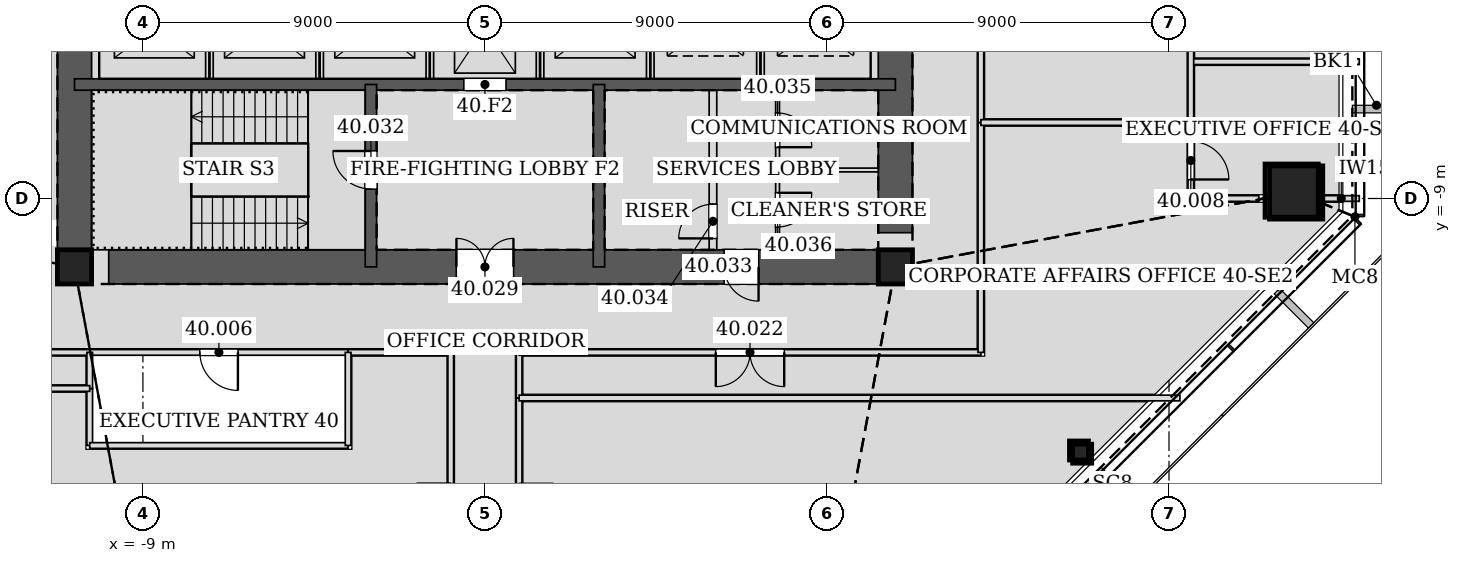
"""IFC4 building model, lengths in metres.
Left out: names, types, materials, properties, quantities, classifications, styles, units other than length and angle.
Written with IfcOpenShell. Run it as: python <this file> out.ifc"""

import sys

from ifc_helpers import new_model, si_unit, direction, frame, frame_2d, origin, origin_2d, place, context, subcontext, project, spatial, rectangle, hollow_rectangle, extrude, element, fill, save


model = new_model("IFC4")
c1 = context("Model", 3, precision=1e-05, world=origin(), true_north=direction((0.0, 1.0)))
c2 = subcontext(c1, "Body", "Model", "MODEL_VIEW")
j1 = project(units=[si_unit("LENGTHUNIT", "METRE"), si_unit("PLANEANGLEUNIT", "RADIAN")], contexts=[c1])
p1 = place(None, origin())
s1 = spatial("IfcSite", under=j1, at=p1, CompositionType="ELEMENT")
p2 = place(p1, origin())
s2 = spatial("IfcBuilding", under=s1, at=p2, CompositionType="ELEMENT")
p3 = place(p2, frame((0.0, 0.0, 176.4)))
s3 = spatial("IfcBuildingStorey", under=s2, at=p3, CompositionType="ELEMENT", Elevation=176.4)
p4 = place(p3, frame((21.346, -8.842, 0.0), z_axis=(-0.028294087032, 0.011735945751, 0.999530746009), x_axis=(-0.383133442967, -0.923693003589, 0.0)))
e1 = element("IfcColumn", 1, at=p4, inside=s3, PredefinedType="COLUMN", context=c2, shape_type="SweptSolid", body=[
    extrude(hollow_rectangle(XDim=1.4, YDim=1.4, WallThickness=0.065, at=origin_2d()), origin(), (0.0, 0.0, 1.0), 4.202),
])
p5 = place(p3, frame((15.715, -15.715, 0.0), z_axis=(-0.019987360289, 0.019987360289, 0.999600425599), x_axis=(-0.707106781187, -0.707106781187, 0.0)))
e2 = element("IfcColumn", 2, at=p5, inside=s3, PredefinedType="COLUMN", context=c2, shape_type="SweptSolid", body=[
    extrude(hollow_rectangle(XDim=0.5, YDim=0.5, WallThickness=0.025, at=origin_2d()), origin(), (0.0, 0.0, 1.0), 4.202),
])
for number, where, z_axis, x_axis in (
    (3, (-10.8, -10.8, 0.0), (0.0, 0.0, 1.0), (1.0, 0.0, 0.0)),
    (4, (10.8, -10.8, 0.0), (0.0, 0.0, 1.0), (1.0, 0.0, 0.0)),
):
    element("IfcColumn", number, at=place(p3, frame(where, z_axis=z_axis, x_axis=x_axis)), inside=s3, PredefinedType="COLUMN", context=c2, shape_type="SweptSolid", body=[
        extrude(hollow_rectangle(XDim=0.9, YDim=0.9, WallThickness=0.06, at=origin_2d()), origin(), (0.0, 0.0, 1.0), 4.2),
    ])
p6 = place(p3, frame((-10.8, -10.8, 0.0), z_axis=(0.0, 0.0, 1.0), x_axis=(1.0, 0.0, 0.0)))
e5 = element("IfcWall", 5, at=p6, inside=s3, PredefinedType="SOLIDWALL", context=c2, shape_type="SweptSolid", body=[
    extrude(rectangle(XDim=21.6, YDim=0.9, at=frame_2d((10.8, 0.0))), origin(), (0.0, 0.0, 1.0), 4.2),
])
p7 = place(p6, frame((10.05, 0.0, 0.0)))
e6 = element("IfcOpeningElement", 6, at=p7, cuts=e5, PredefinedType="OPENING", context=c2, shape_type="SweptSolid", body=[
    extrude(rectangle(XDim=1.5, YDim=2.1, at=frame_2d((0.75, 1.05))), frame((0.0, 0.46, 0.0), z_axis=(0.0, -1.0, 0.0), x_axis=(1.0, 0.0, 0.0)), (0.0, 0.0, 1.0), 0.92),
])
p8 = place(p6, frame((17.1, 0.0, 0.0)))
e7 = element("IfcOpeningElement", 7, at=p8, cuts=e5, PredefinedType="OPENING", context=c2, shape_type="SweptSolid", body=[
    extrude(rectangle(XDim=0.9, YDim=2.1, at=frame_2d((0.45, 1.05))), frame((0.0, 0.46, 0.0), z_axis=(0.0, -1.0, 0.0), x_axis=(1.0, 0.0, 0.0)), (0.0, 0.0, 1.0), 0.92),
])
p9 = place(p3, frame((10.8, -10.8, 0.0), z_axis=(0.0, 0.0, 1.0), x_axis=(0.0, 1.0, 0.0)))
e8 = element("IfcWall", 8, at=p9, inside=s3, PredefinedType="SOLIDWALL", context=c2, shape_type="SweptSolid", body=[
    extrude(rectangle(XDim=21.6, YDim=0.9, at=frame_2d((10.8, 0.0))), origin(), (0.0, 0.0, 1.0), 4.2),
])
p10 = place(p9, frame((11.7, 0.0, 0.0)))
e9 = element("IfcOpeningElement", 9, at=p10, cuts=e8, PredefinedType="OPENING", context=c2, shape_type="SweptSolid", body=[
    extrude(rectangle(XDim=1.2, YDim=2.1, at=frame_2d((0.6, 1.05))), frame((0.0, 0.46, 0.0), z_axis=(0.0, -1.0, 0.0), x_axis=(1.0, 0.0, 0.0)), (0.0, 0.0, 1.0), 0.92),
])
p11 = place(p9, frame((8.7, 0.0, 0.0)))
e10 = element("IfcOpeningElement", 10, at=p11, cuts=e8, PredefinedType="OPENING", context=c2, shape_type="SweptSolid", body=[
    extrude(rectangle(XDim=1.2, YDim=2.1, at=frame_2d((0.6, 1.05))), frame((0.0, 0.46, 0.0), z_axis=(0.0, -1.0, 0.0), x_axis=(1.0, 0.0, 0.0)), (0.0, 0.0, 1.0), 0.92),
])
p12 = place(p3, frame((-10.8, 10.8, 0.0), z_axis=(0.0, 0.0, 1.0), x_axis=(0.0, -1.0, 0.0)))
e11 = element("IfcWall", 11, at=p12, inside=s3, PredefinedType="SOLIDWALL", context=c2, shape_type="SweptSolid", body=[
    extrude(rectangle(XDim=21.6, YDim=0.9, at=frame_2d((10.8, 0.0))), origin(), (0.0, 0.0, 1.0), 4.2),
])
p13 = place(p12, frame((8.7, 0.0, 0.0)))
e12 = element("IfcOpeningElement", 12, at=p13, cuts=e11, PredefinedType="OPENING", context=c2, shape_type="SweptSolid", body=[
    extrude(rectangle(XDim=1.2, YDim=2.1, at=frame_2d((0.6, 1.05))), frame((0.0, 0.46, 0.0), z_axis=(0.0, -1.0, 0.0), x_axis=(1.0, 0.0, 0.0)), (0.0, 0.0, 1.0), 0.92),
])
p14 = place(p12, frame((11.7, 0.0, 0.0)))
e13 = element("IfcOpeningElement", 13, at=p14, cuts=e11, PredefinedType="OPENING", context=c2, shape_type="SweptSolid", body=[
    extrude(rectangle(XDim=1.2, YDim=2.1, at=frame_2d((0.6, 1.05))), frame((0.0, 0.46, 0.0), z_axis=(0.0, -1.0, 0.0), x_axis=(1.0, 0.0, 0.0)), (0.0, 0.0, 1.0), 0.92),
])
p15 = place(p3, frame((-10.8, -6.0, 0.0), z_axis=(0.0, 0.0, 1.0), x_axis=(1.0, 0.0, 0.0)))
e14 = element("IfcWall", 14, at=p15, inside=s3, PredefinedType="SOLIDWALL", context=c2, shape_type="SweptSolid", body=[
    extrude(rectangle(XDim=21.6, YDim=0.3, at=frame_2d((10.8, 0.0))), origin(), (0.0, 0.0, 1.0), 4.2),
])
p16 = place(p15, frame((10.25, 0.0, 0.0)))
e15 = element("IfcOpeningElement", 15, at=p16, cuts=e14, PredefinedType="OPENING", context=c2, shape_type="SweptSolid", body=[
    extrude(rectangle(XDim=1.1, YDim=2.1, at=frame_2d((0.55, 1.05))), frame((0.0, 0.16, 0.0), z_axis=(0.0, -1.0, 0.0), x_axis=(1.0, 0.0, 0.0)), (0.0, 0.0, 1.0), 0.32),
])
p17 = place(p3, frame((-3.0, -6.0, 0.0), z_axis=(0.0, 0.0, 1.0), x_axis=(0.0, -1.0, 0.0)))
e16 = element("IfcWall", 16, at=p17, inside=s3, PredefinedType="SOLIDWALL", context=c2, shape_type="SweptSolid", body=[
    extrude(rectangle(XDim=4.8, YDim=0.3, at=frame_2d((2.4, 0.0))), origin(), (0.0, 0.0, 1.0), 4.2),
])
p18 = place(p17, frame((1.75, 0.0, 0.0)))
e17 = element("IfcOpeningElement", 17, at=p18, cuts=e16, PredefinedType="OPENING", context=c2, shape_type="SweptSolid", body=[
    extrude(rectangle(XDim=1.0, YDim=2.1, at=frame_2d((0.5, 1.05))), frame((0.0, 0.16, 0.0), z_axis=(0.0, -1.0, 0.0), x_axis=(1.0, 0.0, 0.0)), (0.0, 0.0, 1.0), 0.32),
])
p19 = place(p3, frame((3.0, -6.0, 0.0), z_axis=(0.0, 0.0, 1.0), x_axis=(0.0, -1.0, 0.0)))
e18 = element("IfcWall", 18, at=p19, inside=s3, PredefinedType="SOLIDWALL", context=c2, shape_type="SweptSolid", body=[
    extrude(rectangle(XDim=4.8, YDim=0.3, at=frame_2d((2.4, 0.0))), origin(), (0.0, 0.0, 1.0), 4.2),
])
p20 = place(p3, frame((-10.401, -13.05, 0.0), z_axis=(0.0, 0.0, 1.0), x_axis=(1.0, 0.0, 0.0)))
e19 = element("IfcWall", 19, at=p20, inside=s3, PredefinedType="PARTITIONING", context=c2, shape_type="SweptSolid", body=[
    extrude(rectangle(XDim=6.802, YDim=0.15, at=frame_2d((3.401, 0.0))), origin(), (0.0, 0.0, 1.0), 3.098),
])
p21 = place(p20, frame((2.901, 0.0, 0.0)))
e20 = element("IfcOpeningElement", 20, at=p21, cuts=e19, PredefinedType="OPENING", context=c2, shape_type="SweptSolid", body=[
    extrude(rectangle(XDim=1.0, YDim=2.1, at=frame_2d((0.5, 1.05))), frame((0.0, 0.085, 0.0), z_axis=(0.0, -1.0, 0.0), x_axis=(1.0, 0.0, 0.0)), (0.0, 0.0, 1.0), 0.17),
])
p22 = place(p3, frame((-3.601, -13.05, 0.0), z_axis=(0.0, 0.0, 1.0), x_axis=(1.0, 0.0, 0.0)))
e21 = element("IfcWall", 21, at=p22, inside=s3, PredefinedType="PARTITIONING", context=c2, shape_type="SweptSolid", body=[
    extrude(rectangle(XDim=2.701, YDim=0.15, at=frame_2d((1.351, 0.0))), origin(), (0.0, 0.0, 1.0), 4.035),
])
p23 = place(p3, frame((-0.9, -13.05, 0.0), z_axis=(0.0, 0.0, 1.0), x_axis=(0.0, -1.0, 0.0)))
e22 = element("IfcWall", 22, at=p23, inside=s3, PredefinedType="PARTITIONING", context=c2, shape_type="SweptSolid", body=[
    extrude(rectangle(XDim=9.958, YDim=0.15, at=frame_2d((4.979, 0.0))), origin(), (0.0, 0.0, 1.0), 3.426),
])
p24 = place(p23, frame((3.452, 0.0, 0.0)))
e23 = element("IfcOpeningElement", 23, at=p24, cuts=e22, PredefinedType="OPENING", context=c2, shape_type="SweptSolid", body=[
    extrude(rectangle(XDim=1.8, YDim=2.4, at=frame_2d((0.9, 1.2))), frame((0.0, 0.085, 0.0), z_axis=(0.0, -1.0, 0.0), x_axis=(1.0, 0.0, 0.0)), (0.0, 0.0, 1.0), 0.17),
])
p25 = place(p3, frame((-13.05, -13.05, 0.0), z_axis=(0.0, 0.0, 1.0), x_axis=(1.0, 0.0, 0.0)))
e24 = element("IfcWall", 24, at=p25, inside=s3, PredefinedType="PARTITIONING", context=c2, shape_type="SweptSolid", body=[
    extrude(rectangle(XDim=2.651, YDim=0.15, at=frame_2d((1.326, 0.0))), origin(), (0.0, 0.0, 1.0), 3.098),
])
p26 = place(p3, frame((0.9, -23.009, 0.0), z_axis=(0.0, 0.0, 1.0), x_axis=(0.0, 1.0, 0.0)))
e25 = element("IfcWall", 25, at=p26, inside=s3, PredefinedType="PARTITIONING", context=c2, shape_type="SweptSolid", body=[
    extrude(rectangle(XDim=8.76, YDim=0.15, at=frame_2d((4.38, 0.0))), origin(), (0.0, 0.0, 1.0), 3.492),
])
p27 = place(p26, frame((4.702, 0.0, 0.0)))
e26 = element("IfcOpeningElement", 26, at=p27, cuts=e25, PredefinedType="OPENING", context=c2, shape_type="SweptSolid", body=[
    extrude(rectangle(XDim=1.8, YDim=2.4, at=frame_2d((0.9, 1.2))), frame((0.0, 0.085, 0.0), z_axis=(0.0, -1.0, 0.0), x_axis=(1.0, 0.0, 0.0)), (0.0, 0.0, 1.0), 0.17),
])
p28 = place(p3, frame((0.9, -14.251, 0.0), z_axis=(0.0, 0.0, 1.0), x_axis=(0.0, 1.0, 0.0)))
e27 = element("IfcWall", 27, at=p28, inside=s3, PredefinedType="PARTITIONING", context=c2, shape_type="SweptSolid", body=[
    extrude(rectangle(XDim=1.201, YDim=0.15, at=frame_2d((0.601, 0.0))), origin(), (0.0, 0.0, 1.0), 3.426),
])
p29 = place(p3, frame((0.9, -13.05, 0.0), z_axis=(0.0, 0.0, 1.0), x_axis=(1.0, 0.0, 0.0)))
e28 = element("IfcWall", 28, at=p29, inside=s3, PredefinedType="PARTITIONING", context=c2, shape_type="SweptSolid", body=[
    extrude(rectangle(XDim=12.15, YDim=0.15, at=frame_2d((6.075, 0.0))), origin(), (0.0, 0.0, 1.0), 3.098),
])
p30 = place(p29, frame((5.175, 0.0, 0.0)))
e29 = element("IfcOpeningElement", 29, at=p30, cuts=e28, PredefinedType="OPENING", context=c2, shape_type="SweptSolid", body=[
    extrude(rectangle(XDim=1.8, YDim=2.4, at=frame_2d((0.9, 1.2))), frame((0.0, 0.085, 0.0), z_axis=(0.0, -1.0, 0.0), x_axis=(1.0, 0.0, 0.0)), (0.0, 0.0, 1.0), 0.17),
])
p31 = place(p3, frame((13.05, -13.05, 0.0), z_axis=(0.0, 0.0, 1.0), x_axis=(0.0, 1.0, 0.0)))
e30 = element("IfcWall", 30, at=p31, inside=s3, PredefinedType="PARTITIONING", context=c2, shape_type="SweptSolid", body=[
    extrude(rectangle(XDim=6.051, YDim=0.15, at=frame_2d((3.025, 0.0))), origin(), (0.0, 0.0, 1.0), 3.098),
])
p32 = place(p3, frame((13.05, -7.001, 0.0), z_axis=(0.0, 0.0, 1.0), x_axis=(0.0, 1.0, 0.0)))
e31 = element("IfcWall", 31, at=p32, inside=s3, PredefinedType="PARTITIONING", context=c2, shape_type="SweptSolid", body=[
    extrude(rectangle(XDim=2.502, YDim=0.15, at=frame_2d((1.251, 0.0))), origin(), (0.0, 0.0, 1.0), 4.035),
])
p33 = place(p3, frame((-10.4, -13.999, 0.0), z_axis=(0.0, 0.0, 1.0), x_axis=(0.0, -1.0, 0.0)))
e32 = element("IfcWall", 32, at=p33, inside=s3, PredefinedType="PARTITIONING", context=c2, shape_type="SweptSolid", body=[
    extrude(rectangle(XDim=1.501, YDim=0.15, at=frame_2d((0.75, 0.0))), origin(), (0.0, 0.0, 1.0), 3.098),
])
p34 = place(p3, frame((-10.4, -15.5, 0.0), z_axis=(0.0, 0.0, 1.0), x_axis=(1.0, 0.0, 0.0)))
e33 = element("IfcWall", 33, at=p34, inside=s3, PredefinedType="PARTITIONING", context=c2, shape_type="SweptSolid", body=[
    extrude(rectangle(XDim=6.8, YDim=0.15, at=frame_2d((3.4, 0.0))), origin(), (0.0, 0.0, 1.0), 3.098),
])
p35 = place(p3, frame((-3.6, -15.5, 0.0), z_axis=(0.0, 0.0, 1.0), x_axis=(0.0, 1.0, 0.0)))
e34 = element("IfcWall", 34, at=p35, inside=s3, PredefinedType="PARTITIONING", context=c2, shape_type="SweptSolid", body=[
    extrude(rectangle(XDim=2.45, YDim=0.15, at=frame_2d((1.225, 0.0))), origin(), (0.0, 0.0, 1.0), 3.426),
])
p36 = place(p3, frame((-10.4, -13.05, 0.0), z_axis=(0.0, 0.0, 1.0), x_axis=(0.0, -1.0, 0.0)))
e35 = element("IfcWall", 35, at=p36, inside=s3, PredefinedType="PARTITIONING", context=c2, shape_type="SweptSolid", body=[
    extrude(rectangle(XDim=0.951, YDim=0.15, at=frame_2d((0.476, 0.0))), origin(), (0.0, 0.0, 1.0), 3.098),
])
p37 = place(p3, frame((23.007, -5.4, 0.0), z_axis=(0.0, 0.0, 1.0), x_axis=(-1.0, 0.0, 0.0)))
e36 = element("IfcWall", 36, at=p37, inside=s3, PredefinedType="PARTITIONING", context=c2, shape_type="SweptSolid", body=[
    extrude(rectangle(XDim=4.432, YDim=0.15, at=frame_2d((2.216, 0.0))), origin(), (0.0, 0.0, 1.0), 3.492),
])
p38 = place(p3, frame((18.575, -6.999, 0.0), z_axis=(0.0, 0.0, 1.0), x_axis=(0.0, -1.0, 0.0)))
e37 = element("IfcWall", 37, at=p38, inside=s3, PredefinedType="PARTITIONING", context=c2, shape_type="SweptSolid", body=[
    extrude(rectangle(XDim=2.001, YDim=0.15, at=frame_2d((1.0, 0.0))), origin(), (0.0, 0.0, 1.0), 4.035),
])
p39 = place(p38, frame((0.5, 0.0, 0.0)))
e38 = element("IfcOpeningElement", 38, at=p39, cuts=e37, PredefinedType="OPENING", context=c2, shape_type="SweptSolid", body=[
    extrude(rectangle(XDim=1.0, YDim=2.1, at=frame_2d((0.5, 1.05))), frame((0.0, 0.085, 0.0), z_axis=(0.0, -1.0, 0.0), x_axis=(1.0, 0.0, 0.0)), (0.0, 0.0, 1.0), 0.17),
])
p40 = place(p3, frame((18.575, -9.0, 0.0), z_axis=(0.0, 0.0, 1.0), x_axis=(1.0, 0.0, 0.0)))
e39 = element("IfcWall", 39, at=p40, inside=s3, PredefinedType="PARTITIONING", context=c2, shape_type="SweptSolid", body=[
    extrude(rectangle(XDim=1.789, YDim=0.15, at=frame_2d((0.894, 0.0))), origin(), (0.0, 0.0, 1.0), 3.098),
])
p41 = place(p3, frame((22.06, -9.0, 0.0), z_axis=(0.0, 0.0, 1.0), x_axis=(1.0, 0.0, 0.0)))
e40 = element("IfcWall", 40, at=p41, inside=s3, PredefinedType="PARTITIONING", context=c2, shape_type="SweptSolid", body=[
    extrude(rectangle(XDim=0.947, YDim=0.15, at=frame_2d((0.474, 0.0))), origin(), (0.0, 0.0, 1.0), 4.035),
])
p42 = place(p3, frame((18.575, -7.001, 0.0), z_axis=(0.0, 0.0, 1.0), x_axis=(0.0, 1.0, 0.0)))
e41 = element("IfcWall", 41, at=p42, inside=s3, PredefinedType="PARTITIONING", context=c2, shape_type="SweptSolid", body=[
    extrude(rectangle(XDim=5.201, YDim=0.15, at=frame_2d((2.601, 0.0))), origin(), (0.0, 0.0, 1.0), 4.035),
])
p43 = place(p3, frame((-10.4, -14.0, 0.0), z_axis=(0.0, 0.0, 1.0), x_axis=(-1.0, 0.0, 0.0)))
e42 = element("IfcWall", 42, at=p43, inside=s3, PredefinedType="PARTITIONING", context=c2, shape_type="SweptSolid", body=[
    extrude(rectangle(XDim=8.138, YDim=0.15, at=frame_2d((4.069, 0.0))), origin(), (0.0, 0.0, 1.0), 3.342),
])
p44 = place(p3, frame((18.288, -14.25, 0.0), z_axis=(0.0, 0.0, 1.0), x_axis=(-1.0, 0.0, 0.0)))
e43 = element("IfcWall", 43, at=p44, inside=s3, PredefinedType="PARTITIONING", context=c2, shape_type="SweptSolid", body=[
    extrude(rectangle(XDim=17.388, YDim=0.15, at=frame_2d((8.694, 0.0))), origin(), (0.0, 0.0, 1.0), 3.098),
])
p45 = place(p3, frame((18.575, -7.0, 0.0), z_axis=(0.0, 0.0, 1.0), x_axis=(-1.0, 0.0, 0.0)))
e44 = element("IfcWall", 44, at=p45, inside=s3, PredefinedType="PARTITIONING", context=c2, shape_type="SweptSolid", body=[
    extrude(rectangle(XDim=5.525, YDim=0.15, at=frame_2d((2.762, 0.0))), origin(), (0.0, 0.0, 1.0), 3.426),
])
for number, where, z_axis, x_axis in (
    (45, (-7.25, -5.85, 0.0), (0.0, 0.0, 1.0), (0.0, 1.0, 0.0)),
    (46, (-4.35, -5.85, 0.0), (0.0, 0.0, 1.0), (0.0, 1.0, 0.0)),
    (47, (-1.45, -5.85, 0.0), (0.0, 0.0, 1.0), (0.0, 1.0, 0.0)),
    (48, (1.45, -5.85, 0.0), (0.0, 0.0, 1.0), (0.0, 1.0, 0.0)),
    (49, (4.35, -5.85, 0.0), (0.0, 0.0, 1.0), (0.0, 1.0, 0.0)),
    (50, (7.25, -5.85, 0.0), (0.0, 0.0, 1.0), (0.0, 1.0, 0.0)),
):
    element("IfcWall", number, at=place(p3, frame(where, z_axis=z_axis, x_axis=x_axis)), inside=s3, PredefinedType="PARTITIONING", context=c2, shape_type="SweptSolid", body=[
        extrude(rectangle(XDim=2.7, YDim=0.2, at=frame_2d((1.35, 0.0))), origin(), (0.0, 0.0, 1.0), 4.2),
    ])
p46 = place(p3, frame((6.0, -10.35, 0.0), z_axis=(0.0, 0.0, 1.0), x_axis=(0.0, 1.0, 0.0)))
e51 = element("IfcWall", 51, at=p46, inside=s3, PredefinedType="PARTITIONING", context=c2, shape_type="SweptSolid", body=[
    extrude(rectangle(XDim=4.2, YDim=0.2, at=frame_2d((2.1, 0.0))), origin(), (0.0, 0.0, 1.0), 4.035),
])
p47 = place(p46, frame((0.3, 0.0, 0.0)))
e52 = element("IfcOpeningElement", 52, at=p47, cuts=e51, PredefinedType="OPENING", context=c2, shape_type="SweptSolid", body=[
    extrude(rectangle(XDim=0.9, YDim=2.1, at=frame_2d((0.45, 1.05))), frame((0.0, 0.11, 0.0), z_axis=(0.0, -1.0, 0.0), x_axis=(1.0, 0.0, 0.0)), (0.0, 0.0, 1.0), 0.22),
])
p48 = place(p3, frame((7.7, -10.35, 0.0), z_axis=(0.0, 0.0, 1.0), x_axis=(0.0, 1.0, 0.0)))
e53 = element("IfcWall", 53, at=p48, inside=s3, PredefinedType="PARTITIONING", context=c2, shape_type="SweptSolid", body=[
    extrude(rectangle(XDim=4.2, YDim=0.1, at=frame_2d((2.1, 0.0))), origin(), (0.0, 0.0, 1.0), 4.035),
])
p49 = place(p48, frame((2.7, 0.0, 0.0)))
e54 = element("IfcOpeningElement", 54, at=p49, cuts=e53, PredefinedType="OPENING", context=c2, shape_type="SweptSolid", body=[
    extrude(rectangle(XDim=0.9, YDim=2.1, at=frame_2d((0.45, 1.05))), frame((0.0, 0.06, 0.0), z_axis=(0.0, -1.0, 0.0), x_axis=(1.0, 0.0, 0.0)), (0.0, 0.0, 1.0), 0.12),
])
p50 = place(p48, frame((0.6, 0.0, 0.0)))
e55 = element("IfcOpeningElement", 55, at=p50, cuts=e53, PredefinedType="OPENING", context=c2, shape_type="SweptSolid", body=[
    extrude(rectangle(XDim=0.9, YDim=2.1, at=frame_2d((0.45, 1.05))), frame((0.0, 0.06, 0.0), z_axis=(0.0, -1.0, 0.0), x_axis=(1.0, 0.0, 0.0)), (0.0, 0.0, 1.0), 0.12),
])
p51 = place(p3, frame((7.7, -8.25, 0.0), z_axis=(0.0, 0.0, 1.0), x_axis=(1.0, 0.0, 0.0)))
e56 = element("IfcWall", 56, at=p51, inside=s3, PredefinedType="PARTITIONING", context=c2, shape_type="SweptSolid", body=[
    extrude(rectangle(XDim=2.65, YDim=0.1, at=frame_2d((1.325, 0.0))), origin(), (0.0, 0.0, 1.0), 4.035),
])
p52 = place(p21, frame((1.0, 0.0, 0.0), z_axis=(0.0, 0.0, 1.0), x_axis=(-1.0, 0.0, 0.0)))
e57 = element("IfcDoor", 57, at=p52, inside=s3, OperationType="SINGLE_SWING_LEFT", PredefinedType="DOOR", context=c2, shape_type="SweptSolid", body=[
    extrude(rectangle(XDim=1.0, YDim=2.1, at=frame_2d((0.5, 1.05))), frame((0.0, 0.025, 0.0), z_axis=(0.0, -1.0, 0.0), x_axis=(1.0, 0.0, 0.0)), (0.0, 0.0, 1.0), 0.05),
])
fill(e20, e57)
p53 = place(p39, origin())
e58 = element("IfcDoor", 58, at=p53, inside=s3, OperationType="SINGLE_SWING_RIGHT", PredefinedType="DOOR", context=c2, shape_type="SweptSolid", body=[
    extrude(rectangle(XDim=1.0, YDim=2.1, at=frame_2d((0.5, 1.05))), frame((0.0, 0.025, 0.0), z_axis=(0.0, -1.0, 0.0), x_axis=(1.0, 0.0, 0.0)), (0.0, 0.0, 1.0), 0.05),
])
fill(e38, e58)
p54 = place(p30, frame((1.8, 0.0, 0.0), z_axis=(0.0, 0.0, 1.0), x_axis=(-1.0, 0.0, 0.0)))
e59 = element("IfcDoor", 59, at=p54, inside=s3, OperationType="DOUBLE_DOOR_SINGLE_SWING", PredefinedType="DOOR", context=c2, shape_type="SweptSolid", body=[
    extrude(rectangle(XDim=1.8, YDim=2.4, at=frame_2d((0.9, 1.2))), frame((0.0, 0.025, 0.0), z_axis=(0.0, -1.0, 0.0), x_axis=(1.0, 0.0, 0.0)), (0.0, 0.0, 1.0), 0.05),
])
fill(e29, e59)
p55 = place(p7, origin())
e60 = element("IfcDoor", 60, at=p55, inside=s3, OperationType="DOUBLE_DOOR_SINGLE_SWING", PredefinedType="DOOR", context=c2, shape_type="SweptSolid", body=[
    extrude(rectangle(XDim=1.5, YDim=2.1, at=frame_2d((0.75, 1.05))), frame((0.0, 0.025, 0.0), z_axis=(0.0, -1.0, 0.0), x_axis=(1.0, 0.0, 0.0)), (0.0, 0.0, 1.0), 0.05),
])
fill(e6, e60)
p56 = place(p18, frame((1.0, 0.0, 0.0), z_axis=(0.0, 0.0, 1.0), x_axis=(-1.0, 0.0, 0.0)))
e61 = element("IfcDoor", 61, at=p56, inside=s3, OperationType="SINGLE_SWING_RIGHT", PredefinedType="DOOR", context=c2, shape_type="SweptSolid", body=[
    extrude(rectangle(XDim=1.0, YDim=2.1, at=frame_2d((0.5, 1.05))), frame((0.0, 0.025, 0.0), z_axis=(0.0, -1.0, 0.0), x_axis=(1.0, 0.0, 0.0)), (0.0, 0.0, 1.0), 0.05),
])
fill(e17, e61)
p57 = place(p8, frame((0.9, 0.0, 0.0), z_axis=(0.0, 0.0, 1.0), x_axis=(-1.0, 0.0, 0.0)))
e62 = element("IfcDoor", 62, at=p57, inside=s3, OperationType="SINGLE_SWING_LEFT", PredefinedType="DOOR", context=c2, shape_type="SweptSolid", body=[
    extrude(rectangle(XDim=0.9, YDim=2.1, at=frame_2d((0.45, 1.05))), frame((0.0, 0.025, 0.0), z_axis=(0.0, -1.0, 0.0), x_axis=(1.0, 0.0, 0.0)), (0.0, 0.0, 1.0), 0.05),
])
fill(e7, e62)
p58 = place(p47, origin())
e63 = element("IfcDoor", 63, at=p58, inside=s3, OperationType="SINGLE_SWING_LEFT", PredefinedType="DOOR", context=c2, shape_type="SweptSolid", body=[
    extrude(rectangle(XDim=0.9, YDim=2.1, at=frame_2d((0.45, 1.05))), frame((0.0, 0.025, 0.0), z_axis=(0.0, -1.0, 0.0), x_axis=(1.0, 0.0, 0.0)), (0.0, 0.0, 1.0), 0.05),
])
fill(e52, e63)
p59 = place(p49, frame((0.9, 0.0, 0.0), z_axis=(0.0, 0.0, 1.0), x_axis=(-1.0, 0.0, 0.0)))
e64 = element("IfcDoor", 64, at=p59, inside=s3, OperationType="SINGLE_SWING_RIGHT", PredefinedType="DOOR", context=c2, shape_type="SweptSolid", body=[
    extrude(rectangle(XDim=0.9, YDim=2.1, at=frame_2d((0.45, 1.05))), frame((0.0, 0.025, 0.0), z_axis=(0.0, -1.0, 0.0), x_axis=(1.0, 0.0, 0.0)), (0.0, 0.0, 1.0), 0.05),
])
fill(e54, e64)
p60 = place(p50, frame((0.9, 0.0, 0.0), z_axis=(0.0, 0.0, 1.0), x_axis=(-1.0, 0.0, 0.0)))
e65 = element("IfcDoor", 65, at=p60, inside=s3, OperationType="SINGLE_SWING_LEFT", PredefinedType="DOOR", context=c2, shape_type="SweptSolid", body=[
    extrude(rectangle(XDim=0.9, YDim=2.1, at=frame_2d((0.45, 1.05))), frame((0.0, 0.025, 0.0), z_axis=(0.0, -1.0, 0.0), x_axis=(1.0, 0.0, 0.0)), (0.0, 0.0, 1.0), 0.05),
])
fill(e55, e65)
p61 = place(p16, origin())
e66 = element("IfcDoor", 66, at=p61, inside=s3, OperationType="DOUBLE_DOOR_SLIDING", PredefinedType="DOOR", context=c2, shape_type="SweptSolid", body=[
    extrude(rectangle(XDim=1.1, YDim=2.1, at=frame_2d((0.55, 1.05))), frame((0.0, 0.025, 0.0), z_axis=(0.0, -1.0, 0.0), x_axis=(1.0, 0.0, 0.0)), (0.0, 0.0, 1.0), 0.05),
])
fill(e15, e66)
save(model, sys.argv[1])
